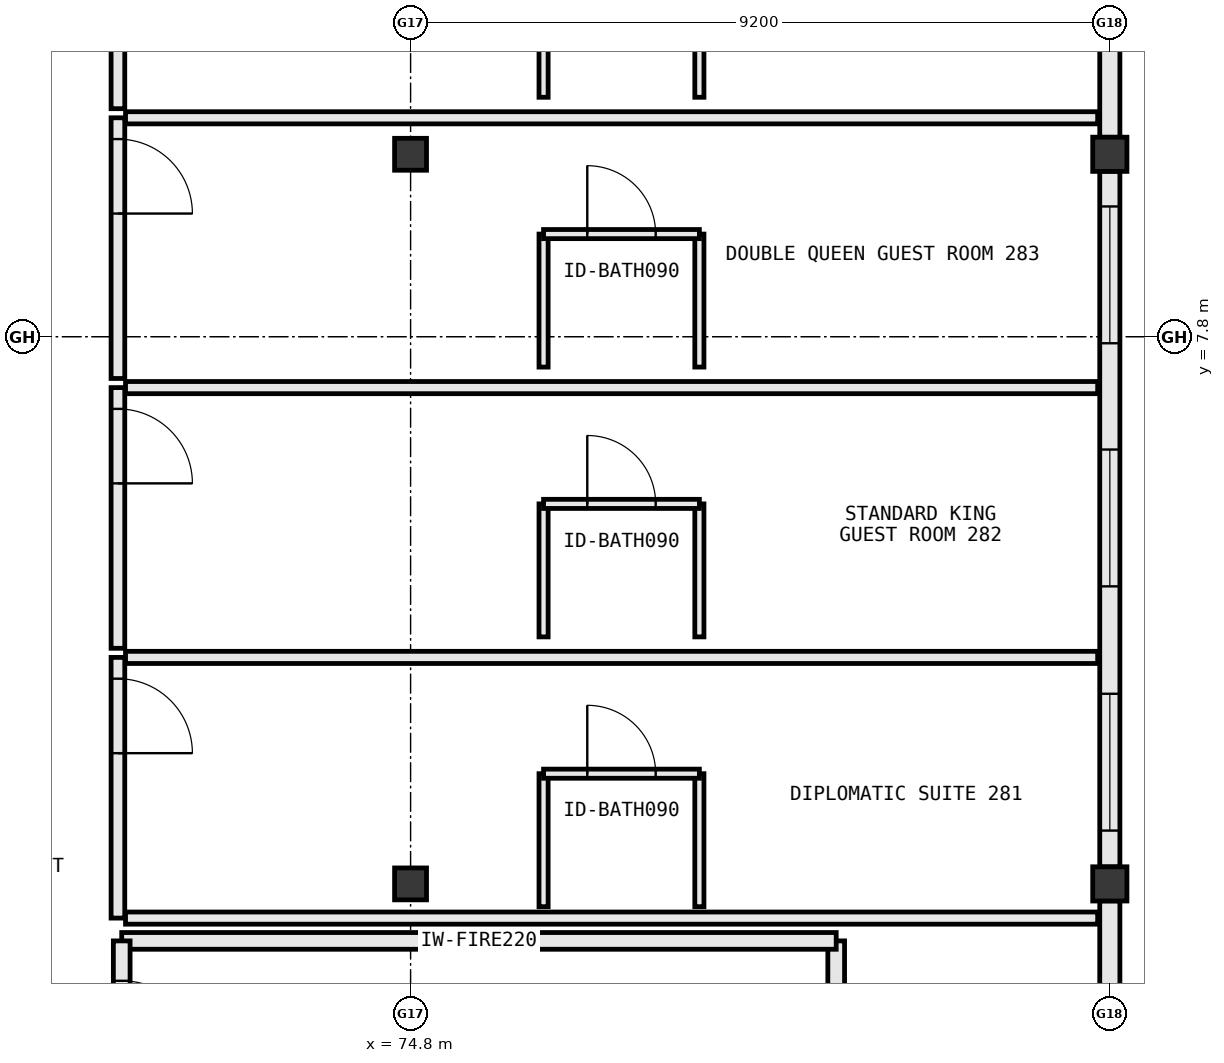
"""IFC4 building model, lengths in metres.
Left out: names, types, materials, properties, quantities, classifications, styles, units other than length and angle.
Written with IfcOpenShell. Run it as: python <this file> out.ifc"""

import sys

from ifc_helpers import new_model, si_unit, direction, frame, frame_2d, origin, origin_2d, place, context, subcontext, project, spatial, rectangle, extrude, element, fill, save


model = new_model("IFC4")
c1 = context("Model", 3, precision=1e-05, world=origin(), true_north=direction((0.0, 1.0)))
c2 = subcontext(c1, "Body", "Model", "MODEL_VIEW")
j1 = project(units=[si_unit("LENGTHUNIT", "METRE"), si_unit("PLANEANGLEUNIT", "RADIAN")], contexts=[c1])
p1 = place(None, origin())
s1 = spatial("IfcSite", under=j1, at=p1, CompositionType="ELEMENT")
p2 = place(p1, origin())
s2 = spatial("IfcBuilding", under=s1, at=p2, CompositionType="ELEMENT")
p3 = place(p2, frame((0.0, 0.0, 42.8)))
s3 = spatial("IfcBuildingStorey", under=s2, at=p3, CompositionType="ELEMENT", Elevation=42.8)
for number, where, z_axis, x_axis in (
    (1, (74.8, 0.6, 0.0), (0.0, 0.0, 1.0), (1.0, 0.0, 0.0)),
    (2, (74.8, 10.2, 0.0), (0.0, 0.0, 1.0), (1.0, 0.0, 0.0)),
):
    element("IfcColumn", number, at=place(p3, frame(where, z_axis=z_axis, x_axis=x_axis)), inside=s3, PredefinedType="COLUMN", context=c2, shape_type="SweptSolid", body=[
        extrude(rectangle(XDim=0.42, YDim=0.42, at=origin_2d()), origin(), (0.0, 0.0, 1.0), 3.8),
    ])
for number, where, z_axis, x_axis in (
    (3, (84.0, 0.6, 0.0), (0.0, 0.0, 1.0), (1.0, 0.0, 0.0)),
    (4, (84.0, 10.2, 0.0), (0.0, 0.0, 1.0), (1.0, 0.0, 0.0)),
):
    element("IfcColumn", number, at=place(p3, frame(where, z_axis=z_axis, x_axis=x_axis)), inside=s3, PredefinedType="COLUMN", context=c2, shape_type="SweptSolid", body=[
        extrude(rectangle(XDim=0.45, YDim=0.45, at=origin_2d()), origin(), (0.0, 0.0, 1.0), 3.8),
    ])
p4 = place(p3, frame((84.0, -8.777, 0.0), z_axis=(0.0, 0.0, 1.0), x_axis=(0.0, 1.0, 0.0)))
e5 = element("IfcWall", 5, at=p4, inside=s3, PredefinedType="STANDARD", context=c2, shape_type="SweptSolid", body=[
    extrude(rectangle(XDim=9.154, YDim=0.265, at=frame_2d((4.577, 0.0))), origin(), (0.0, 0.0, 1.0), 2.955),
])
p5 = place(p4, frame((1.614, 0.0, 0.85)))
e6 = element("IfcOpeningElement", 6, at=p5, cuts=e5, PredefinedType="OPENING", context=c2, shape_type="SweptSolid", body=[
    extrude(rectangle(XDim=1.35, YDim=1.65, at=frame_2d((0.675, 0.825))), frame((0.0, 0.145, 0.0), z_axis=(0.0, -1.0, 0.0), x_axis=(1.0, 0.0, 0.0)), (0.0, 0.0, 1.0), 0.289),
])
p6 = place(p4, frame((6.19, 0.0, 0.85)))
e7 = element("IfcOpeningElement", 7, at=p6, cuts=e5, PredefinedType="OPENING", context=c2, shape_type="SweptSolid", body=[
    extrude(rectangle(XDim=1.35, YDim=1.65, at=frame_2d((0.675, 0.825))), frame((0.0, 0.145, 0.0), z_axis=(0.0, -1.0, 0.0), x_axis=(1.0, 0.0, 0.0)), (0.0, 0.0, 1.0), 0.289),
])
p7 = place(p3, frame((84.0, 0.823, 0.0), z_axis=(0.0, 0.0, 1.0), x_axis=(0.0, 1.0, 0.0)))
e8 = element("IfcWall", 8, at=p7, inside=s3, PredefinedType="STANDARD", context=c2, shape_type="SweptSolid", body=[
    extrude(rectangle(XDim=9.154, YDim=0.265, at=frame_2d((4.577, 0.0))), origin(), (0.0, 0.0, 1.0), 2.955),
])
p8 = place(p7, frame((0.479, 0.0, 0.85)))
e9 = element("IfcOpeningElement", 9, at=p8, cuts=e8, PredefinedType="OPENING", context=c2, shape_type="SweptSolid", body=[
    extrude(rectangle(XDim=1.8, YDim=1.85, at=frame_2d((0.9, 0.925))), frame((0.0, 0.145, 0.0), z_axis=(0.0, -1.0, 0.0), x_axis=(1.0, 0.0, 0.0)), (0.0, 0.0, 1.0), 0.289),
])
p9 = place(p7, frame((3.692, 0.0, 0.85)))
e10 = element("IfcOpeningElement", 10, at=p9, cuts=e8, PredefinedType="OPENING", context=c2, shape_type="SweptSolid", body=[
    extrude(rectangle(XDim=1.8, YDim=1.85, at=frame_2d((0.9, 0.925))), frame((0.0, 0.145, 0.0), z_axis=(0.0, -1.0, 0.0), x_axis=(1.0, 0.0, 0.0)), (0.0, 0.0, 1.0), 0.289),
])
p10 = place(p7, frame((6.89, 0.0, 0.85)))
e11 = element("IfcOpeningElement", 11, at=p10, cuts=e8, PredefinedType="OPENING", context=c2, shape_type="SweptSolid", body=[
    extrude(rectangle(XDim=1.8, YDim=1.85, at=frame_2d((0.9, 0.925))), frame((0.0, 0.145, 0.0), z_axis=(0.0, -1.0, 0.0), x_axis=(1.0, 0.0, 0.0)), (0.0, 0.0, 1.0), 0.289),
])
p11 = place(p3, frame((84.0, 10.423, 0.0), z_axis=(0.0, 0.0, 1.0), x_axis=(0.0, 1.0, 0.0)))
e12 = element("IfcWall", 12, at=p11, inside=s3, PredefinedType="STANDARD", context=c2, shape_type="SweptSolid", body=[
    extrude(rectangle(XDim=7.954, YDim=0.265, at=frame_2d((3.977, 0.0))), origin(), (0.0, 0.0, 1.0), 2.955),
])
p12 = place(p11, frame((1.192, 0.0, 0.85)))
e13 = element("IfcOpeningElement", 13, at=p12, cuts=e12, PredefinedType="OPENING", context=c2, shape_type="SweptSolid", body=[
    extrude(rectangle(XDim=1.8, YDim=1.85, at=frame_2d((0.9, 0.925))), frame((0.0, 0.145, 0.0), z_axis=(0.0, -1.0, 0.0), x_axis=(1.0, 0.0, 0.0)), (0.0, 0.0, 1.0), 0.289),
])
p13 = place(p11, frame((4.742, 0.0, 0.85)))
e14 = element("IfcOpeningElement", 14, at=p13, cuts=e12, PredefinedType="OPENING", context=c2, shape_type="SweptSolid", body=[
    extrude(rectangle(XDim=1.8, YDim=1.85, at=frame_2d((0.9, 0.925))), frame((0.0, 0.145, 0.0), z_axis=(0.0, -1.0, 0.0), x_axis=(1.0, 0.0, 0.0)), (0.0, 0.0, 1.0), 0.289),
])
p14 = place(p3, frame((80.4, -2.25, 0.0), z_axis=(0.0, 0.0, 1.0), x_axis=(0.0, 1.0, 0.0)))
e15 = element("IfcWall", 15, at=p14, inside=s3, PredefinedType="STANDARD", context=c2, shape_type="SweptSolid", body=[
    extrude(rectangle(XDim=2.1, YDim=0.22, at=frame_2d((1.05, 0.0))), origin(), (0.0, 0.0, 1.0), 3.54),
])
p15 = place(p3, frame((80.4, -0.15, 0.0), z_axis=(0.0, 0.0, 1.0), x_axis=(-1.0, 0.0, 0.0)))
e16 = element("IfcWall", 16, at=p15, inside=s3, PredefinedType="STANDARD", context=c2, shape_type="SweptSolid", body=[
    extrude(rectangle(XDim=9.4, YDim=0.22, at=frame_2d((4.7, 0.0))), origin(), (0.0, 0.0, 1.0), 3.54),
])
p16 = place(p3, frame((71.0, -0.15, 0.0), z_axis=(0.0, 0.0, 1.0), x_axis=(0.0, -1.0, 0.0)))
e17 = element("IfcWall", 17, at=p16, inside=s3, PredefinedType="STANDARD", context=c2, shape_type="SweptSolid", body=[
    extrude(rectangle(XDim=2.1, YDim=0.22, at=frame_2d((1.05, 0.0))), origin(), (0.0, 0.0, 1.0), 3.54),
])
p17 = place(p16, frame((0.525, 0.0, 0.0)))
e18 = element("IfcOpeningElement", 18, at=p17, cuts=e17, PredefinedType="OPENING", context=c2, shape_type="SweptSolid", body=[
    extrude(rectangle(XDim=1.05, YDim=2.2, at=frame_2d((0.525, 1.1))), frame((0.0, 0.122, 0.0), z_axis=(0.0, -1.0, 0.0), x_axis=(1.0, 0.0, 0.0)), (0.0, 0.0, 1.0), 0.244),
])
p18 = place(p3, frame((70.95, 3.58, 0.0), z_axis=(0.0, 0.0, 1.0), x_axis=(0.0, -1.0, 0.0)))
e19 = element("IfcWall", 19, at=p18, inside=s3, PredefinedType="PARTITIONING", context=c2, shape_type="SweptSolid", body=[
    extrude(rectangle(XDim=3.43, YDim=0.18, at=frame_2d((1.715, 0.0))), origin(), (0.0, 0.0, 1.0), 3.54),
])
p19 = place(p18, frame((0.28, 0.0, 0.0)))
e20 = element("IfcOpeningElement", 20, at=p19, cuts=e19, PredefinedType="OPENING", context=c2, shape_type="SweptSolid", body=[
    extrude(rectangle(XDim=0.98, YDim=2.18, at=frame_2d((0.49, 1.09))), frame((0.0, 0.102, 0.0), z_axis=(0.0, -1.0, 0.0), x_axis=(1.0, 0.0, 0.0)), (0.0, 0.0, 1.0), 0.204),
])
for number, where, z_axis, x_axis in (
    (21, (71.05, 0.15, 0.0), (0.0, 0.0, 1.0), (1.0, 0.0, 0.0)),
    (22, (71.05, 3.58, 0.0), (0.0, 0.0, 1.0), (1.0, 0.0, 0.0)),
):
    element("IfcWall", number, at=place(p3, frame(where, z_axis=z_axis, x_axis=x_axis)), inside=s3, PredefinedType="PARTITIONING", context=c2, shape_type="SweptSolid", body=[
        extrude(rectangle(XDim=12.79, YDim=0.16, at=frame_2d((6.395, 0.0))), origin(), (0.0, 0.0, 1.0), 3.54),
    ])
for number, where, z_axis, x_axis in (
    (23, (76.55, 0.3, 0.0), (0.0, 0.0, 1.0), (0.0, 1.0, 0.0)),
    (24, (78.6, 0.3, 0.0), (0.0, 0.0, 1.0), (0.0, 1.0, 0.0)),
):
    element("IfcWall", number, at=place(p3, frame(where, z_axis=z_axis, x_axis=x_axis)), inside=s3, PredefinedType="PARTITIONING", context=c2, shape_type="SweptSolid", body=[
        extrude(rectangle(XDim=1.75, YDim=0.12, at=frame_2d((0.875, 0.0))), origin(), (0.0, 0.0, 1.0), 3.54),
    ])
p20 = place(p3, frame((76.55, 2.05, 0.0), z_axis=(0.0, 0.0, 1.0), x_axis=(1.0, 0.0, 0.0)))
e25 = element("IfcWall", 25, at=p20, inside=s3, PredefinedType="PARTITIONING", context=c2, shape_type="SweptSolid", body=[
    extrude(rectangle(XDim=2.05, YDim=0.12, at=frame_2d((1.025, 0.0))), origin(), (0.0, 0.0, 1.0), 3.54),
])
p21 = place(p20, frame((0.575, 0.0, 0.0)))
e26 = element("IfcOpeningElement", 26, at=p21, cuts=e25, PredefinedType="OPENING", context=c2, shape_type="SweptSolid", body=[
    extrude(rectangle(XDim=0.9, YDim=2.15, at=frame_2d((0.45, 1.075))), frame((0.0, 0.072, 0.0), z_axis=(0.0, -1.0, 0.0), x_axis=(1.0, 0.0, 0.0)), (0.0, 0.0, 1.0), 0.144),
])
p22 = place(p3, frame((70.95, 7.13, 0.0), z_axis=(0.0, 0.0, 1.0), x_axis=(0.0, -1.0, 0.0)))
e27 = element("IfcWall", 27, at=p22, inside=s3, PredefinedType="PARTITIONING", context=c2, shape_type="SweptSolid", body=[
    extrude(rectangle(XDim=3.43, YDim=0.18, at=frame_2d((1.715, 0.0))), origin(), (0.0, 0.0, 1.0), 3.54),
])
p23 = place(p22, frame((0.28, 0.0, 0.0)))
e28 = element("IfcOpeningElement", 28, at=p23, cuts=e27, PredefinedType="OPENING", context=c2, shape_type="SweptSolid", body=[
    extrude(rectangle(XDim=0.98, YDim=2.18, at=frame_2d((0.49, 1.09))), frame((0.0, 0.102, 0.0), z_axis=(0.0, -1.0, 0.0), x_axis=(1.0, 0.0, 0.0)), (0.0, 0.0, 1.0), 0.204),
])
p24 = place(p3, frame((71.05, 7.13, 0.0), z_axis=(0.0, 0.0, 1.0), x_axis=(1.0, 0.0, 0.0)))
e29 = element("IfcWall", 29, at=p24, inside=s3, PredefinedType="PARTITIONING", context=c2, shape_type="SweptSolid", body=[
    extrude(rectangle(XDim=12.79, YDim=0.16, at=frame_2d((6.395, 0.0))), origin(), (0.0, 0.0, 1.0), 3.54),
])
for number, where, z_axis, x_axis in (
    (30, (76.55, 3.85, 0.0), (0.0, 0.0, 1.0), (0.0, 1.0, 0.0)),
    (31, (78.6, 3.85, 0.0), (0.0, 0.0, 1.0), (0.0, 1.0, 0.0)),
):
    element("IfcWall", number, at=place(p3, frame(where, z_axis=z_axis, x_axis=x_axis)), inside=s3, PredefinedType="PARTITIONING", context=c2, shape_type="SweptSolid", body=[
        extrude(rectangle(XDim=1.75, YDim=0.12, at=frame_2d((0.875, 0.0))), origin(), (0.0, 0.0, 1.0), 3.54),
    ])
p25 = place(p3, frame((76.55, 5.6, 0.0), z_axis=(0.0, 0.0, 1.0), x_axis=(1.0, 0.0, 0.0)))
e32 = element("IfcWall", 32, at=p25, inside=s3, PredefinedType="PARTITIONING", context=c2, shape_type="SweptSolid", body=[
    extrude(rectangle(XDim=2.05, YDim=0.12, at=frame_2d((1.025, 0.0))), origin(), (0.0, 0.0, 1.0), 3.54),
])
p26 = place(p25, frame((0.575, 0.0, 0.0)))
e33 = element("IfcOpeningElement", 33, at=p26, cuts=e32, PredefinedType="OPENING", context=c2, shape_type="SweptSolid", body=[
    extrude(rectangle(XDim=0.9, YDim=2.15, at=frame_2d((0.45, 1.075))), frame((0.0, 0.072, 0.0), z_axis=(0.0, -1.0, 0.0), x_axis=(1.0, 0.0, 0.0)), (0.0, 0.0, 1.0), 0.144),
])
p27 = place(p3, frame((70.95, 10.68, 0.0), z_axis=(0.0, 0.0, 1.0), x_axis=(0.0, -1.0, 0.0)))
e34 = element("IfcWall", 34, at=p27, inside=s3, PredefinedType="PARTITIONING", context=c2, shape_type="SweptSolid", body=[
    extrude(rectangle(XDim=3.43, YDim=0.18, at=frame_2d((1.715, 0.0))), origin(), (0.0, 0.0, 1.0), 3.54),
])
p28 = place(p27, frame((0.28, 0.0, 0.0)))
e35 = element("IfcOpeningElement", 35, at=p28, cuts=e34, PredefinedType="OPENING", context=c2, shape_type="SweptSolid", body=[
    extrude(rectangle(XDim=0.98, YDim=2.18, at=frame_2d((0.49, 1.09))), frame((0.0, 0.102, 0.0), z_axis=(0.0, -1.0, 0.0), x_axis=(1.0, 0.0, 0.0)), (0.0, 0.0, 1.0), 0.204),
])
p29 = place(p3, frame((71.05, 10.68, 0.0), z_axis=(0.0, 0.0, 1.0), x_axis=(1.0, 0.0, 0.0)))
e36 = element("IfcWall", 36, at=p29, inside=s3, PredefinedType="PARTITIONING", context=c2, shape_type="SweptSolid", body=[
    extrude(rectangle(XDim=12.79, YDim=0.16, at=frame_2d((6.395, 0.0))), origin(), (0.0, 0.0, 1.0), 3.54),
])
for number, where, z_axis, x_axis in (
    (37, (76.55, 7.4, 0.0), (0.0, 0.0, 1.0), (0.0, 1.0, 0.0)),
    (38, (78.6, 7.4, 0.0), (0.0, 0.0, 1.0), (0.0, 1.0, 0.0)),
):
    element("IfcWall", number, at=place(p3, frame(where, z_axis=z_axis, x_axis=x_axis)), inside=s3, PredefinedType="PARTITIONING", context=c2, shape_type="SweptSolid", body=[
        extrude(rectangle(XDim=1.75, YDim=0.12, at=frame_2d((0.875, 0.0))), origin(), (0.0, 0.0, 1.0), 3.54),
    ])
p30 = place(p3, frame((76.55, 9.15, 0.0), z_axis=(0.0, 0.0, 1.0), x_axis=(1.0, 0.0, 0.0)))
e39 = element("IfcWall", 39, at=p30, inside=s3, PredefinedType="PARTITIONING", context=c2, shape_type="SweptSolid", body=[
    extrude(rectangle(XDim=2.05, YDim=0.12, at=frame_2d((1.025, 0.0))), origin(), (0.0, 0.0, 1.0), 3.54),
])
p31 = place(p30, frame((0.575, 0.0, 0.0)))
e40 = element("IfcOpeningElement", 40, at=p31, cuts=e39, PredefinedType="OPENING", context=c2, shape_type="SweptSolid", body=[
    extrude(rectangle(XDim=0.9, YDim=2.15, at=frame_2d((0.45, 1.075))), frame((0.0, 0.072, 0.0), z_axis=(0.0, -1.0, 0.0), x_axis=(1.0, 0.0, 0.0)), (0.0, 0.0, 1.0), 0.144),
])
p32 = place(p3, frame((70.95, 14.23, 0.0), z_axis=(0.0, 0.0, 1.0), x_axis=(0.0, -1.0, 0.0)))
e41 = element("IfcWall", 41, at=p32, inside=s3, PredefinedType="PARTITIONING", context=c2, shape_type="SweptSolid", body=[
    extrude(rectangle(XDim=3.43, YDim=0.18, at=frame_2d((1.715, 0.0))), origin(), (0.0, 0.0, 1.0), 3.54),
])
p33 = place(p32, frame((0.28, 0.0, 0.0)))
e42 = element("IfcOpeningElement", 42, at=p33, cuts=e41, PredefinedType="OPENING", context=c2, shape_type="SweptSolid", body=[
    extrude(rectangle(XDim=0.98, YDim=2.18, at=frame_2d((0.49, 1.09))), frame((0.0, 0.102, 0.0), z_axis=(0.0, -1.0, 0.0), x_axis=(1.0, 0.0, 0.0)), (0.0, 0.0, 1.0), 0.204),
])
for number, where, z_axis, x_axis in (
    (43, (76.55, 10.95, 0.0), (0.0, 0.0, 1.0), (0.0, 1.0, 0.0)),
    (44, (78.6, 10.95, 0.0), (0.0, 0.0, 1.0), (0.0, 1.0, 0.0)),
):
    element("IfcWall", number, at=place(p3, frame(where, z_axis=z_axis, x_axis=x_axis)), inside=s3, PredefinedType="PARTITIONING", context=c2, shape_type="SweptSolid", body=[
        extrude(rectangle(XDim=1.75, YDim=0.12, at=frame_2d((0.875, 0.0))), origin(), (0.0, 0.0, 1.0), 3.54),
    ])
p34 = place(p8, origin())
e45 = element("IfcWindow", 45, at=p34, inside=s3, PartitioningType="SINGLE_PANEL", PredefinedType="WINDOW", context=c2, shape_type="SweptSolid", body=[
    extrude(rectangle(XDim=1.8, YDim=1.85, at=frame_2d((0.9, 0.925))), frame((0.0, 0.03, 0.0), z_axis=(0.0, -1.0, 0.0), x_axis=(1.0, 0.0, 0.0)), (0.0, 0.0, 1.0), 0.06),
])
fill(e9, e45)
p35 = place(p9, origin())
e46 = element("IfcWindow", 46, at=p35, inside=s3, PartitioningType="SINGLE_PANEL", PredefinedType="WINDOW", context=c2, shape_type="SweptSolid", body=[
    extrude(rectangle(XDim=1.8, YDim=1.85, at=frame_2d((0.9, 0.925))), frame((0.0, 0.03, 0.0), z_axis=(0.0, -1.0, 0.0), x_axis=(1.0, 0.0, 0.0)), (0.0, 0.0, 1.0), 0.06),
])
fill(e10, e46)
p36 = place(p10, origin())
e47 = element("IfcWindow", 47, at=p36, inside=s3, PartitioningType="SINGLE_PANEL", PredefinedType="WINDOW", context=c2, shape_type="SweptSolid", body=[
    extrude(rectangle(XDim=1.8, YDim=1.85, at=frame_2d((0.9, 0.925))), frame((0.0, 0.03, 0.0), z_axis=(0.0, -1.0, 0.0), x_axis=(1.0, 0.0, 0.0)), (0.0, 0.0, 1.0), 0.06),
])
fill(e11, e47)
p37 = place(p17, origin())
e48 = element("IfcDoor", 48, at=p37, inside=s3, OperationType="SINGLE_SWING_RIGHT", PredefinedType="DOOR", context=c2, shape_type="SweptSolid", body=[
    extrude(rectangle(XDim=1.05, YDim=2.2, at=frame_2d((0.525, 1.1))), frame((0.0, 0.025, 0.0), z_axis=(0.0, -1.0, 0.0), x_axis=(1.0, 0.0, 0.0)), (0.0, 0.0, 1.0), 0.05),
])
fill(e18, e48)
p38 = place(p19, origin())
e49 = element("IfcDoor", 49, at=p38, inside=s3, OperationType="SINGLE_SWING_RIGHT", PredefinedType="DOOR", context=c2, shape_type="SweptSolid", body=[
    extrude(rectangle(XDim=0.98, YDim=2.18, at=frame_2d((0.49, 1.09))), frame((0.0, 0.025, 0.0), z_axis=(0.0, -1.0, 0.0), x_axis=(1.0, 0.0, 0.0)), (0.0, 0.0, 1.0), 0.05),
])
fill(e20, e49)
p39 = place(p21, origin())
e50 = element("IfcDoor", 50, at=p39, inside=s3, OperationType="SINGLE_SWING_LEFT", PredefinedType="DOOR", context=c2, shape_type="SweptSolid", body=[
    extrude(rectangle(XDim=0.9, YDim=2.15, at=frame_2d((0.45, 1.075))), frame((0.0, 0.025, 0.0), z_axis=(0.0, -1.0, 0.0), x_axis=(1.0, 0.0, 0.0)), (0.0, 0.0, 1.0), 0.05),
])
fill(e26, e50)
p40 = place(p23, origin())
e51 = element("IfcDoor", 51, at=p40, inside=s3, OperationType="SINGLE_SWING_RIGHT", PredefinedType="DOOR", context=c2, shape_type="SweptSolid", body=[
    extrude(rectangle(XDim=0.98, YDim=2.18, at=frame_2d((0.49, 1.09))), frame((0.0, 0.025, 0.0), z_axis=(0.0, -1.0, 0.0), x_axis=(1.0, 0.0, 0.0)), (0.0, 0.0, 1.0), 0.05),
])
fill(e28, e51)
p41 = place(p26, origin())
e52 = element("IfcDoor", 52, at=p41, inside=s3, OperationType="SINGLE_SWING_LEFT", PredefinedType="DOOR", context=c2, shape_type="SweptSolid", body=[
    extrude(rectangle(XDim=0.9, YDim=2.15, at=frame_2d((0.45, 1.075))), frame((0.0, 0.025, 0.0), z_axis=(0.0, -1.0, 0.0), x_axis=(1.0, 0.0, 0.0)), (0.0, 0.0, 1.0), 0.05),
])
fill(e33, e52)
p42 = place(p28, origin())
e53 = element("IfcDoor", 53, at=p42, inside=s3, OperationType="SINGLE_SWING_RIGHT", PredefinedType="DOOR", context=c2, shape_type="SweptSolid", body=[
    extrude(rectangle(XDim=0.98, YDim=2.18, at=frame_2d((0.49, 1.09))), frame((0.0, 0.025, 0.0), z_axis=(0.0, -1.0, 0.0), x_axis=(1.0, 0.0, 0.0)), (0.0, 0.0, 1.0), 0.05),
])
fill(e35, e53)
p43 = place(p31, origin())
e54 = element("IfcDoor", 54, at=p43, inside=s3, OperationType="SINGLE_SWING_LEFT", PredefinedType="DOOR", context=c2, shape_type="SweptSolid", body=[
    extrude(rectangle(XDim=0.9, YDim=2.15, at=frame_2d((0.45, 1.075))), frame((0.0, 0.025, 0.0), z_axis=(0.0, -1.0, 0.0), x_axis=(1.0, 0.0, 0.0)), (0.0, 0.0, 1.0), 0.05),
])
fill(e40, e54)
save(model, sys.argv[1])
